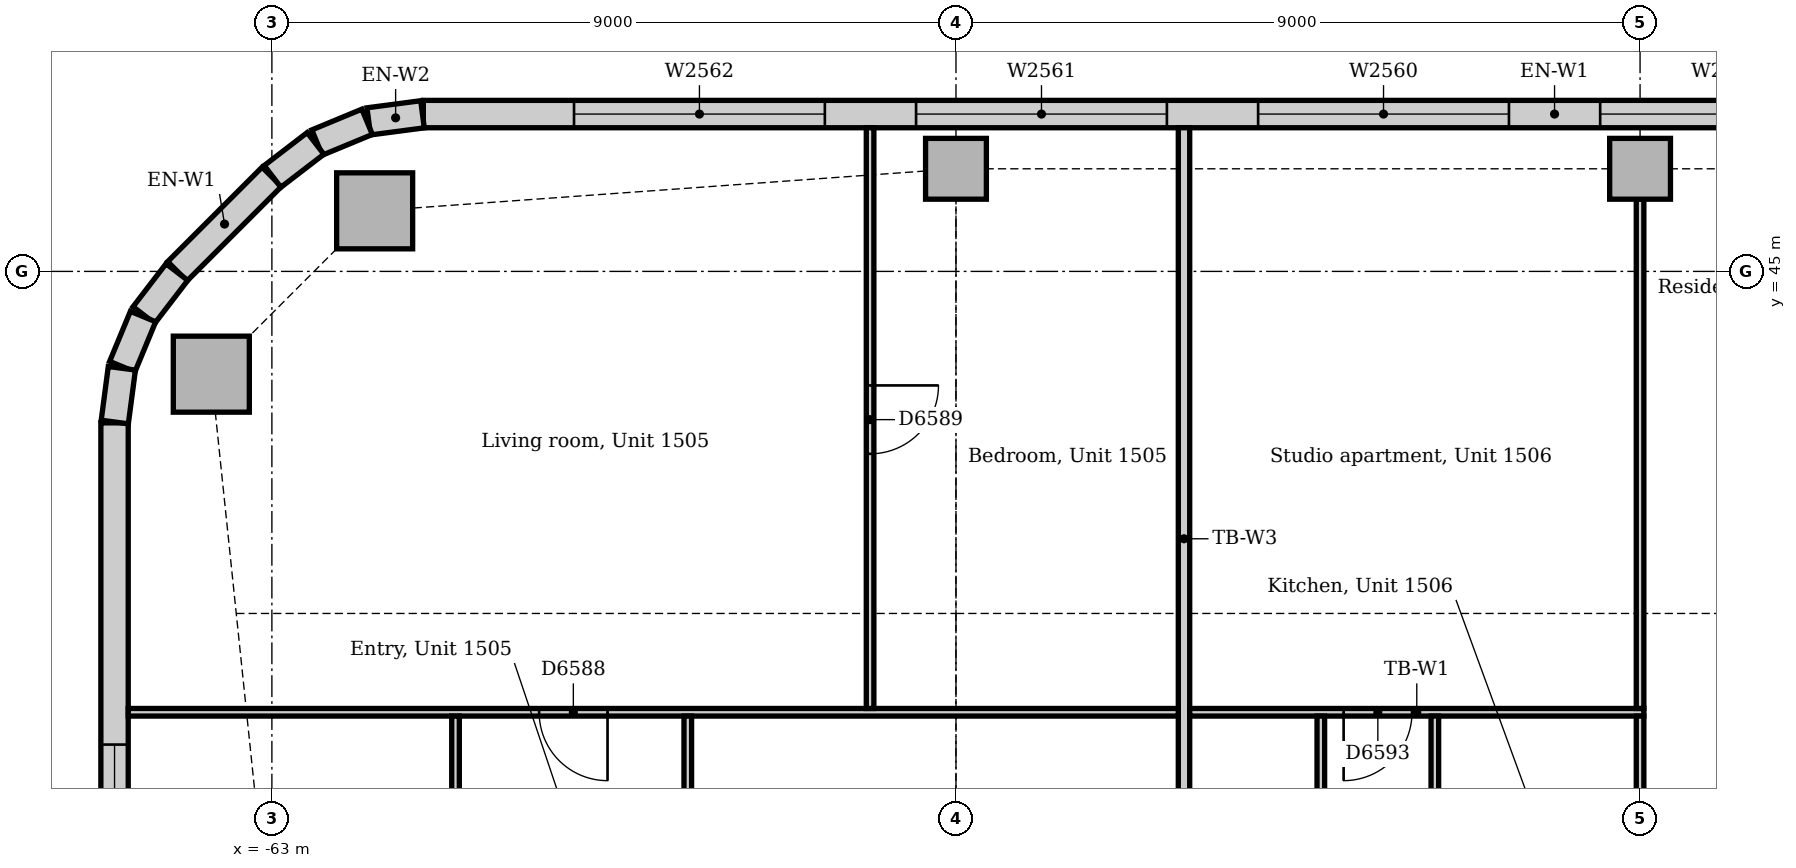
"""IFC4 building model, lengths in metres.
Left out: names, types, materials, properties, quantities, classifications, styles, units other than length and angle.
Written with IfcOpenShell. Run it as: python <this file> out.ifc"""

import sys

from ifc_helpers import new_model, si_unit, direction, frame, frame_2d, origin, origin_2d, place, context, subcontext, project, spatial, rectangle, extrude, element, fill, save


model = new_model("IFC4")
c1 = context("Model", 3, precision=1e-05, world=origin(), true_north=direction((0.0, 1.0)))
c2 = subcontext(c1, "Body", "Model", "MODEL_VIEW")
j1 = project(units=[si_unit("LENGTHUNIT", "METRE"), si_unit("PLANEANGLEUNIT", "RADIAN")], contexts=[c1])
p1 = place(None, origin())
s1 = spatial("IfcSite", under=j1, at=p1, CompositionType="ELEMENT")
p2 = place(p1, origin())
s2 = spatial("IfcBuilding", under=s1, at=p2, CompositionType="ELEMENT")
p3 = place(p2, frame((0.0, 0.0, 67.0)))
s3 = spatial("IfcBuildingStorey", under=s2, at=p3, CompositionType="ELEMENT", Elevation=67.0)
for number, where, z_axis, x_axis in (
    (1, (-61.648, 45.797, 0.0), (0.0, 0.0, 1.0), (1.0, 0.0, 0.0)),
    (2, (-63.797, 43.648, 0.0), (0.0, 0.0, 1.0), (1.0, 0.0, 0.0)),
):
    element("IfcColumn", number, at=place(p3, frame(where, z_axis=z_axis, x_axis=x_axis)), inside=s3, PredefinedType="COLUMN", context=c2, shape_type="SweptSolid", body=[
        extrude(rectangle(XDim=1.0, YDim=1.0, at=origin_2d()), origin(), (0.0, 0.0, 1.0), 3.85),
    ])
for number, where, z_axis, x_axis in (
    (3, (-54.0, 46.35, 0.0), (0.0, 0.0, 1.0), (1.0, 0.0, 0.0)),
    (4, (-45.0, 46.35, 0.0), (0.0, 0.0, 1.0), (1.0, 0.0, 0.0)),
):
    element("IfcColumn", number, at=place(p3, frame(where, z_axis=z_axis, x_axis=x_axis)), inside=s3, PredefinedType="COLUMN", context=c2, shape_type="SweptSolid", body=[
        extrude(rectangle(XDim=0.8, YDim=0.8, at=origin_2d()), origin(), (0.0, 0.0, 1.0), 3.85),
    ])
p4 = place(p3, frame((-31.243, 47.07, 0.0), z_axis=(0.0, 0.0, 1.0), x_axis=(-1.0, 0.0, 0.0)))
e5 = element("IfcWall", 5, at=p4, inside=s3, PredefinedType="STANDARD", context=c2, shape_type="SweptSolid", body=[
    extrude(rectangle(XDim=29.765, YDim=0.36, at=frame_2d((14.882, 0.0))), origin(), (0.0, 0.0, 1.0), 3.85),
])
p5 = place(p4, frame((1.982, 0.0, 0.9)))
e6 = element("IfcOpeningElement", 6, at=p5, cuts=e5, PredefinedType="OPENING", context=c2, shape_type="SweptSolid", body=[
    extrude(rectangle(XDim=3.3, YDim=1.6, at=frame_2d((1.65, 0.8))), frame((0.0, 0.19, 0.0), z_axis=(0.0, -1.0, 0.0), x_axis=(1.0, 0.0, 0.0)), (0.0, 0.0, 1.0), 0.38),
])
p6 = place(p4, frame((6.482, 0.0, 0.9)))
e7 = element("IfcOpeningElement", 7, at=p6, cuts=e5, PredefinedType="OPENING", context=c2, shape_type="SweptSolid", body=[
    extrude(rectangle(XDim=3.3, YDim=1.6, at=frame_2d((1.65, 0.8))), frame((0.0, 0.19, 0.0), z_axis=(0.0, -1.0, 0.0), x_axis=(1.0, 0.0, 0.0)), (0.0, 0.0, 1.0), 0.38),
])
p7 = place(p4, frame((10.982, 0.0, 0.9)))
e8 = element("IfcOpeningElement", 8, at=p7, cuts=e5, PredefinedType="OPENING", context=c2, shape_type="SweptSolid", body=[
    extrude(rectangle(XDim=3.3, YDim=1.6, at=frame_2d((1.65, 0.8))), frame((0.0, 0.19, 0.0), z_axis=(0.0, -1.0, 0.0), x_axis=(1.0, 0.0, 0.0)), (0.0, 0.0, 1.0), 0.38),
])
p8 = place(p4, frame((15.482, 0.0, 0.9)))
e9 = element("IfcOpeningElement", 9, at=p8, cuts=e5, PredefinedType="OPENING", context=c2, shape_type="SweptSolid", body=[
    extrude(rectangle(XDim=3.3, YDim=1.6, at=frame_2d((1.65, 0.8))), frame((0.0, 0.19, 0.0), z_axis=(0.0, -1.0, 0.0), x_axis=(1.0, 0.0, 0.0)), (0.0, 0.0, 1.0), 0.38),
])
p9 = place(p4, frame((19.982, 0.0, 0.9)))
e10 = element("IfcOpeningElement", 10, at=p9, cuts=e5, PredefinedType="OPENING", context=c2, shape_type="SweptSolid", body=[
    extrude(rectangle(XDim=3.3, YDim=1.6, at=frame_2d((1.65, 0.8))), frame((0.0, 0.19, 0.0), z_axis=(0.0, -1.0, 0.0), x_axis=(1.0, 0.0, 0.0)), (0.0, 0.0, 1.0), 0.38),
])
p10 = place(p4, frame((24.482, 0.0, 0.9)))
e11 = element("IfcOpeningElement", 11, at=p10, cuts=e5, PredefinedType="OPENING", context=c2, shape_type="SweptSolid", body=[
    extrude(rectangle(XDim=3.3, YDim=1.6, at=frame_2d((1.65, 0.8))), frame((0.0, 0.19, 0.0), z_axis=(0.0, -1.0, 0.0), x_axis=(1.0, 0.0, 0.0)), (0.0, 0.0, 1.0), 0.38),
])
p11 = place(p3, frame((-63.001, 46.244, 0.0), z_axis=(0.0, 0.0, 1.0), x_axis=(-0.707106781187, -0.707106781187, 0.0)))
e12 = element("IfcWall", 12, at=p11, inside=s3, PredefinedType="STANDARD", context=c2, shape_type="SweptSolid", body=[
    extrude(rectangle(XDim=1.757, YDim=0.36, at=frame_2d((0.879, 0.0))), origin(), (0.0, 0.0, 1.0), 3.85),
])
p12 = place(p3, frame((-65.07, 43.007, 0.0), z_axis=(0.0, 0.0, 1.0), x_axis=(0.0, -1.0, 0.0)))
e13 = element("IfcWall", 13, at=p12, inside=s3, PredefinedType="STANDARD", context=c2, shape_type="SweptSolid", body=[
    extrude(rectangle(XDim=23.765, YDim=0.36, at=frame_2d((11.882, 0.0))), origin(), (0.0, 0.0, 1.0), 3.85),
])
p13 = place(p12, frame((4.232, 0.0, 0.9)))
e14 = element("IfcOpeningElement", 14, at=p13, cuts=e13, PredefinedType="OPENING", context=c2, shape_type="SweptSolid", body=[
    extrude(rectangle(XDim=1.8, YDim=1.6, at=frame_2d((0.9, 0.8))), frame((0.0, 0.19, 0.0), z_axis=(0.0, -1.0, 0.0), x_axis=(1.0, 0.0, 0.0)), (0.0, 0.0, 1.0), 0.38),
])
p14 = place(p12, frame((9.332, 0.0, 0.9)))
e15 = element("IfcOpeningElement", 15, at=p14, cuts=e13, PredefinedType="OPENING", context=c2, shape_type="SweptSolid", body=[
    extrude(rectangle(XDim=1.8, YDim=1.6, at=frame_2d((0.9, 0.8))), frame((0.0, 0.19, 0.0), z_axis=(0.0, -1.0, 0.0), x_axis=(1.0, 0.0, 0.0)), (0.0, 0.0, 1.0), 0.38),
])
p15 = place(p12, frame((12.482, 0.0, 0.9)))
e16 = element("IfcOpeningElement", 16, at=p15, cuts=e13, PredefinedType="OPENING", context=c2, shape_type="SweptSolid", body=[
    extrude(rectangle(XDim=3.3, YDim=1.6, at=frame_2d((1.65, 0.8))), frame((0.0, 0.19, 0.0), z_axis=(0.0, -1.0, 0.0), x_axis=(1.0, 0.0, 0.0)), (0.0, 0.0, 1.0), 0.38),
])
p16 = place(p12, frame((16.982, 0.0, 0.9)))
e17 = element("IfcOpeningElement", 17, at=p16, cuts=e13, PredefinedType="OPENING", context=c2, shape_type="SweptSolid", body=[
    extrude(rectangle(XDim=3.3, YDim=1.6, at=frame_2d((1.65, 0.8))), frame((0.0, 0.19, 0.0), z_axis=(0.0, -1.0, 0.0), x_axis=(1.0, 0.0, 0.0)), (0.0, 0.0, 1.0), 0.38),
])
for number, where, z_axis, x_axis in (
    (18, (-61.019, 47.067, 0.0), (0.0, 0.0, 1.0), (-0.991, -0.131, 0.0)),
    (19, (-61.747, 46.968, 0.0), (0.0, 0.0, 1.0), (-0.924, -0.383, 0.0)),
):
    element("IfcWall", number, at=place(p3, frame(where, z_axis=z_axis, x_axis=x_axis)), inside=s3, PredefinedType="STANDARD", context=c2, shape_type="SweptSolid", body=[
        extrude(rectangle(XDim=0.713, YDim=0.36, at=frame_2d((0.356, 0.0))), origin(), (0.0, 0.0, 1.0), 3.85),
    ])
for number, where, z_axis, x_axis in (
    (20, (-62.425, 46.684, 0.0), (0.0, 0.0, 1.0), (-0.793, -0.609, 0.0)),
    (21, (-64.25, 44.991, 0.0), (0.0, 0.0, 1.0), (-0.609, -0.793, 0.0)),
):
    element("IfcWall", number, at=place(p3, frame(where, z_axis=z_axis, x_axis=x_axis)), inside=s3, PredefinedType="STANDARD", context=c2, shape_type="SweptSolid", body=[
        extrude(rectangle(XDim=0.713, YDim=0.36, at=frame_2d((0.357, 0.0))), origin(), (0.0, 0.0, 1.0), 3.85),
    ])
for number, where, z_axis, x_axis in (
    (22, (-64.695, 44.406, 0.0), (0.0, 0.0, 1.0), (-0.383, -0.924, 0.0)),
    (23, (-64.974, 43.726, 0.0), (0.0, 0.0, 1.0), (-0.131, -0.991, 0.0)),
):
    element("IfcWall", number, at=place(p3, frame(where, z_axis=z_axis, x_axis=x_axis)), inside=s3, PredefinedType="STANDARD", context=c2, shape_type="SweptSolid", body=[
        extrude(rectangle(XDim=0.713, YDim=0.36, at=frame_2d((0.356, 0.0))), origin(), (0.0, 0.0, 1.0), 3.85),
    ])
p17 = place(p3, frame((-51.0, 36.075, 0.0), z_axis=(0.0, 0.0, 1.0), x_axis=(0.0, 1.0, 0.0)))
e24 = element("IfcWall", 24, at=p17, inside=s3, PredefinedType="PARTITIONING", context=c2, shape_type="SweptSolid", body=[
    extrude(rectangle(XDim=10.815, YDim=0.15, at=frame_2d((5.407, 0.0))), origin(), (0.0, 0.0, 1.0), 3.85),
])
p18 = place(p3, frame((-50.925, 39.2, 0.0), z_axis=(0.0, 0.0, 1.0), x_axis=(1.0, 0.0, 0.0)))
e25 = element("IfcWall", 25, at=p18, inside=s3, PredefinedType="PARTITIONING", context=c2, shape_type="SweptSolid", body=[
    extrude(rectangle(XDim=5.975, YDim=0.1, at=frame_2d((2.987, 0.0))), origin(), (0.0, 0.0, 1.0), 3.85),
])
p19 = place(p18, frame((2.025, 0.0, 0.0)))
e26 = element("IfcOpeningElement", 26, at=p19, cuts=e25, PredefinedType="OPENING", context=c2, shape_type="SweptSolid", body=[
    extrude(rectangle(XDim=0.9, YDim=2.1, at=frame_2d((0.45, 1.05))), frame((0.0, 0.06, 0.0), z_axis=(0.0, -1.0, 0.0), x_axis=(1.0, 0.0, 0.0)), (0.0, 0.0, 1.0), 0.12),
])
p20 = place(p3, frame((-64.89, 39.2, 0.0), z_axis=(0.0, 0.0, 1.0), x_axis=(1.0, 0.0, 0.0)))
e27 = element("IfcWall", 27, at=p20, inside=s3, PredefinedType="PARTITIONING", context=c2, shape_type="SweptSolid", body=[
    extrude(rectangle(XDim=13.815, YDim=0.1, at=frame_2d((6.907, 0.0))), origin(), (0.0, 0.0, 1.0), 3.85),
])
p21 = place(p20, frame((5.406, 0.0, 0.0)))
e28 = element("IfcOpeningElement", 28, at=p21, cuts=e27, PredefinedType="OPENING", context=c2, shape_type="SweptSolid", body=[
    extrude(rectangle(XDim=0.9, YDim=2.1, at=frame_2d((0.45, 1.05))), frame((0.0, 0.06, 0.0), z_axis=(0.0, -1.0, 0.0), x_axis=(1.0, 0.0, 0.0)), (0.0, 0.0, 1.0), 0.12),
])
p22 = place(p3, frame((-45.0, 39.25, 0.0), z_axis=(0.0, 0.0, 1.0), x_axis=(0.0, 1.0, 0.0)))
e29 = element("IfcWall", 29, at=p22, inside=s3, PredefinedType="PARTITIONING", context=c2, shape_type="SweptSolid", body=[
    extrude(rectangle(XDim=6.7, YDim=0.1, at=frame_2d((3.35, 0.0))), origin(), (0.0, 0.0, 1.0), 3.256),
])
p23 = place(p3, frame((-45.0, 36.35, 0.0), z_axis=(0.0, 0.0, 1.0), x_axis=(0.0, 1.0, 0.0)))
e30 = element("IfcWall", 30, at=p23, inside=s3, PredefinedType="PARTITIONING", context=c2, shape_type="SweptSolid", body=[
    extrude(rectangle(XDim=2.8, YDim=0.1, at=frame_2d((1.4, 0.0))), origin(), (0.0, 0.0, 1.0), 3.256),
])
p24 = place(p3, frame((-55.13, 39.25, 0.0), z_axis=(0.0, 0.0, 1.0), x_axis=(0.0, 1.0, 0.0)))
e31 = element("IfcWall", 31, at=p24, inside=s3, PredefinedType="PARTITIONING", context=c2, shape_type="SweptSolid", body=[
    extrude(rectangle(XDim=7.64, YDim=0.1, at=frame_2d((3.82, 0.0))), origin(), (0.0, 0.0, 1.0), 3.85),
])
p25 = place(p24, frame((3.35, 0.0, 0.0)))
e32 = element("IfcOpeningElement", 32, at=p25, cuts=e31, PredefinedType="OPENING", context=c2, shape_type="SweptSolid", body=[
    extrude(rectangle(XDim=0.9, YDim=2.1, at=frame_2d((0.45, 1.05))), frame((0.0, 0.06, 0.0), z_axis=(0.0, -1.0, 0.0), x_axis=(1.0, 0.0, 0.0)), (0.0, 0.0, 1.0), 0.12),
])
p26 = place(p3, frame((-60.584, 36.075, 0.0), z_axis=(0.0, 0.0, 1.0), x_axis=(0.0, 1.0, 0.0)))
e33 = element("IfcWall", 33, at=p26, inside=s3, PredefinedType="PARTITIONING", context=c2, shape_type="SweptSolid", body=[
    extrude(rectangle(XDim=3.075, YDim=0.1, at=frame_2d((1.538, 0.0))), origin(), (0.0, 0.0, 1.0), 3.85),
])
p27 = place(p26, frame((1.1, 0.0, 0.0)))
e34 = element("IfcOpeningElement", 34, at=p27, cuts=e33, PredefinedType="OPENING", context=c2, shape_type="SweptSolid", body=[
    extrude(rectangle(XDim=0.9, YDim=2.1, at=frame_2d((0.45, 1.05))), frame((0.0, 0.06, 0.0), z_axis=(0.0, -1.0, 0.0), x_axis=(1.0, 0.0, 0.0)), (0.0, 0.0, 1.0), 0.12),
])
p28 = place(p3, frame((-57.528, 36.075, 0.0), z_axis=(0.0, 0.0, 1.0), x_axis=(0.0, 1.0, 0.0)))
e35 = element("IfcWall", 35, at=p28, inside=s3, PredefinedType="PARTITIONING", context=c2, shape_type="SweptSolid", body=[
    extrude(rectangle(XDim=3.075, YDim=0.1, at=frame_2d((1.538, 0.0))), origin(), (0.0, 0.0, 1.0), 3.85),
])
p29 = place(p28, frame((1.1, 0.0, 0.0)))
e36 = element("IfcOpeningElement", 36, at=p29, cuts=e35, PredefinedType="OPENING", context=c2, shape_type="SweptSolid", body=[
    extrude(rectangle(XDim=0.9, YDim=2.1, at=frame_2d((0.45, 1.05))), frame((0.0, 0.06, 0.0), z_axis=(0.0, -1.0, 0.0), x_axis=(1.0, 0.0, 0.0)), (0.0, 0.0, 1.0), 0.12),
])
p30 = place(p3, frame((-49.2, 36.075, 0.0), z_axis=(0.0, 0.0, 1.0), x_axis=(0.0, 1.0, 0.0)))
e37 = element("IfcWall", 37, at=p30, inside=s3, PredefinedType="PARTITIONING", context=c2, shape_type="SweptSolid", body=[
    extrude(rectangle(XDim=3.075, YDim=0.1, at=frame_2d((1.538, 0.0))), origin(), (0.0, 0.0, 1.0), 3.85),
])
p31 = place(p30, frame((1.1, 0.0, 0.0)))
e38 = element("IfcOpeningElement", 38, at=p31, cuts=e37, PredefinedType="OPENING", context=c2, shape_type="SweptSolid", body=[
    extrude(rectangle(XDim=0.9, YDim=2.1, at=frame_2d((0.45, 1.05))), frame((0.0, 0.06, 0.0), z_axis=(0.0, -1.0, 0.0), x_axis=(1.0, 0.0, 0.0)), (0.0, 0.0, 1.0), 0.12),
])
p32 = place(p3, frame((-47.7, 36.075, 0.0), z_axis=(0.0, 0.0, 1.0), x_axis=(0.0, 1.0, 0.0)))
e39 = element("IfcWall", 39, at=p32, inside=s3, PredefinedType="PARTITIONING", context=c2, shape_type="SweptSolid", body=[
    extrude(rectangle(XDim=3.075, YDim=0.1, at=frame_2d((1.538, 0.0))), origin(), (0.0, 0.0, 1.0), 3.85),
])
p33 = place(p32, frame((1.1, 0.0, 0.0)))
e40 = element("IfcOpeningElement", 40, at=p33, cuts=e39, PredefinedType="OPENING", context=c2, shape_type="SweptSolid", body=[
    extrude(rectangle(XDim=0.9, YDim=2.1, at=frame_2d((0.45, 1.05))), frame((0.0, 0.06, 0.0), z_axis=(0.0, -1.0, 0.0), x_axis=(1.0, 0.0, 0.0)), (0.0, 0.0, 1.0), 0.12),
])
p34 = place(p7, origin())
e41 = element("IfcWindow", 41, at=p34, inside=s3, PartitioningType="SINGLE_PANEL", PredefinedType="WINDOW", context=c2, shape_type="SweptSolid", body=[
    extrude(rectangle(XDim=3.3, YDim=1.6, at=frame_2d((1.65, 0.8))), frame((0.0, 0.13, 0.0), z_axis=(0.0, -1.0, 0.0), x_axis=(1.0, 0.0, 0.0)), (0.0, 0.0, 1.0), 0.06),
])
fill(e8, e41)
p35 = place(p8, origin())
e42 = element("IfcWindow", 42, at=p35, inside=s3, PartitioningType="SINGLE_PANEL", PredefinedType="WINDOW", context=c2, shape_type="SweptSolid", body=[
    extrude(rectangle(XDim=3.3, YDim=1.6, at=frame_2d((1.65, 0.8))), frame((0.0, 0.13, 0.0), z_axis=(0.0, -1.0, 0.0), x_axis=(1.0, 0.0, 0.0)), (0.0, 0.0, 1.0), 0.06),
])
fill(e9, e42)
p36 = place(p9, origin())
e43 = element("IfcWindow", 43, at=p36, inside=s3, PartitioningType="SINGLE_PANEL", PredefinedType="WINDOW", context=c2, shape_type="SweptSolid", body=[
    extrude(rectangle(XDim=3.3, YDim=1.6, at=frame_2d((1.65, 0.8))), frame((0.0, 0.13, 0.0), z_axis=(0.0, -1.0, 0.0), x_axis=(1.0, 0.0, 0.0)), (0.0, 0.0, 1.0), 0.06),
])
fill(e10, e43)
p37 = place(p10, origin())
e44 = element("IfcWindow", 44, at=p37, inside=s3, PartitioningType="SINGLE_PANEL", PredefinedType="WINDOW", context=c2, shape_type="SweptSolid", body=[
    extrude(rectangle(XDim=3.3, YDim=1.6, at=frame_2d((1.65, 0.8))), frame((0.0, 0.13, 0.0), z_axis=(0.0, -1.0, 0.0), x_axis=(1.0, 0.0, 0.0)), (0.0, 0.0, 1.0), 0.06),
])
fill(e11, e44)
p38 = place(p13, origin())
e45 = element("IfcWindow", 45, at=p38, inside=s3, PartitioningType="SINGLE_PANEL", PredefinedType="WINDOW", context=c2, shape_type="SweptSolid", body=[
    extrude(rectangle(XDim=1.8, YDim=1.6, at=frame_2d((0.9, 0.8))), frame((0.0, 0.13, 0.0), z_axis=(0.0, -1.0, 0.0), x_axis=(1.0, 0.0, 0.0)), (0.0, 0.0, 1.0), 0.06),
])
fill(e14, e45)
p39 = place(p21, frame((0.9, 0.0, 0.0), z_axis=(0.0, 0.0, 1.0), x_axis=(-1.0, 0.0, 0.0)))
e46 = element("IfcDoor", 46, at=p39, inside=s3, OperationType="SINGLE_SWING_LEFT", PredefinedType="DOOR", context=c2, shape_type="SweptSolid", body=[
    extrude(rectangle(XDim=0.9, YDim=2.1, at=frame_2d((0.45, 1.05))), frame((0.0, 0.025, 0.0), z_axis=(0.0, -1.0, 0.0), x_axis=(1.0, 0.0, 0.0)), (0.0, 0.0, 1.0), 0.05),
])
fill(e28, e46)
p40 = place(p25, frame((0.9, 0.0, 0.0), z_axis=(0.0, 0.0, 1.0), x_axis=(-1.0, 0.0, 0.0)))
e47 = element("IfcDoor", 47, at=p40, inside=s3, OperationType="SINGLE_SWING_LEFT", PredefinedType="DOOR", context=c2, shape_type="SweptSolid", body=[
    extrude(rectangle(XDim=0.9, YDim=2.1, at=frame_2d((0.45, 1.05))), frame((0.0, 0.025, 0.0), z_axis=(0.0, -1.0, 0.0), x_axis=(1.0, 0.0, 0.0)), (0.0, 0.0, 1.0), 0.05),
])
fill(e32, e47)
p41 = place(p19, frame((0.9, 0.0, 0.0), z_axis=(0.0, 0.0, 1.0), x_axis=(-1.0, 0.0, 0.0)))
e48 = element("IfcDoor", 48, at=p41, inside=s3, OperationType="SINGLE_SWING_RIGHT", PredefinedType="DOOR", context=c2, shape_type="SweptSolid", body=[
    extrude(rectangle(XDim=0.9, YDim=2.1, at=frame_2d((0.45, 1.05))), frame((0.0, 0.025, 0.0), z_axis=(0.0, -1.0, 0.0), x_axis=(1.0, 0.0, 0.0)), (0.0, 0.0, 1.0), 0.05),
])
fill(e26, e48)
save(model, sys.argv[1])
